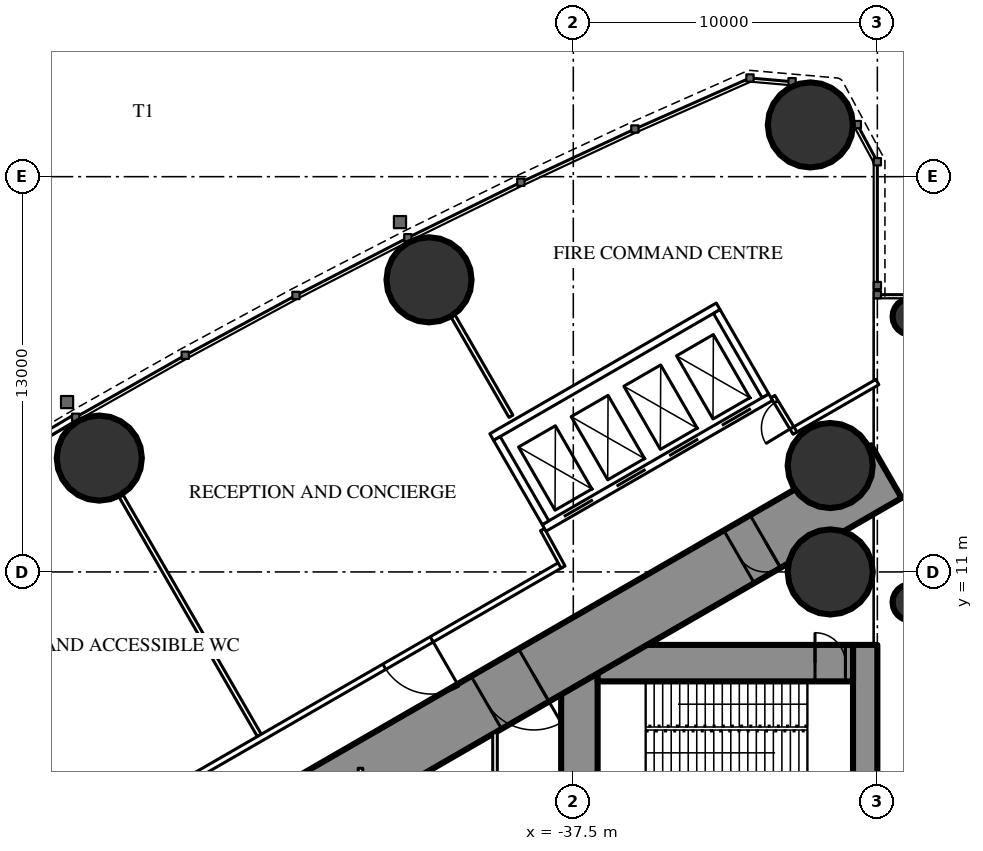
"""IFC4 building model, lengths in metres.
Left out: names, types, materials, properties, quantities, classifications, styles, units other than length and angle.
Written with IfcOpenShell. Run it as: python <this file> out.ifc"""

import sys

from ifc_helpers import new_model, si_unit, direction, frame, frame_2d, origin, origin_2d, place, context, subcontext, project, spatial, rectangle, circle, hollow_circle, extrude, element, fill, save


model = new_model("IFC4")
c1 = context("Model", 3, precision=1e-05, world=origin(), true_north=direction((0.0, 1.0)))
c2 = subcontext(c1, "Body", "Model", "MODEL_VIEW")
j1 = project(units=[si_unit("LENGTHUNIT", "METRE"), si_unit("PLANEANGLEUNIT", "RADIAN")], contexts=[c1])
p1 = place(None, origin())
s1 = spatial("IfcSite", under=j1, at=p1, CompositionType="ELEMENT")
p2 = place(p1, origin())
s2 = spatial("IfcBuilding", under=s1, at=p2, CompositionType="ELEMENT")
p3 = place(p2, origin())
s3 = spatial("IfcBuildingStorey", under=s2, at=p3, CompositionType="ELEMENT", Elevation=0.0)
for number, where, z_axis, x_axis in (
    (1, (-29.703, 25.703, 0.0), (0.0, 0.0, 1.0), (1.0, 0.0, 0.0)),
    (2, (-29.05, 11.0, 0.0), (0.0, 0.0, 1.0), (1.0, 0.0, 0.0)),
    (3, (-29.05, 14.5, 0.0), (0.0, 0.0, 1.0), (1.0, 0.0, 0.0)),
    (4, (-42.245, 20.607, 0.0), (0.0, 0.0, 1.0), (1.0, 0.0, 0.0)),
    (5, (-53.09, 14.745, 0.0), (0.0, 0.0, 1.0), (1.0, 0.0, 0.0)),
):
    element("IfcColumn", number, at=place(p3, frame(where, z_axis=z_axis, x_axis=x_axis)), inside=s3, PredefinedType="COLUMN", context=c2, shape_type="SweptSolid", body=[
        extrude(hollow_circle(Radius=1.4, WallThickness=0.12, at=origin_2d()), origin(), (0.0, 0.0, 1.0), 7.2),
    ])
p4 = place(p3, frame((-27.9, 8.6, 0.0), z_axis=(0.0, 0.0, 1.0), x_axis=(0.0, -1.0, 0.0)))
e6 = element("IfcWall", 6, at=p4, inside=s3, PredefinedType="SHEAR", context=c2, shape_type="SweptSolid", body=[
    extrude(rectangle(XDim=17.2, YDim=0.8, at=frame_2d((8.6, 0.0))), origin(), (0.0, 0.0, 1.0), 7.2),
])
p5 = place(p3, frame((-37.3, 8.6, 0.0), z_axis=(0.0, 0.0, 1.0), x_axis=(0.0, -1.0, 0.0)))
e7 = element("IfcWall", 7, at=p5, inside=s3, PredefinedType="SHEAR", context=c2, shape_type="SweptSolid", body=[
    extrude(rectangle(XDim=17.2, YDim=1.2, at=frame_2d((8.6, 0.0))), origin(), (0.0, 0.0, 1.0), 7.2),
])
p6 = place(p5, frame((7.7, 0.0, 0.0)))
e8 = element("IfcOpeningElement", 8, at=p6, cuts=e7, PredefinedType="OPENING", context=c2, shape_type="SweptSolid", body=[
    extrude(rectangle(XDim=1.8, YDim=2.2, at=frame_2d((0.9, 1.1))), frame((0.0, 0.61, 0.0), z_axis=(0.0, -1.0, 0.0), x_axis=(1.0, 0.0, 0.0)), (0.0, 0.0, 1.0), 1.22),
])
p7 = place(p3, frame((-28.3, 8.0, 0.0), z_axis=(0.0, 0.0, 1.0), x_axis=(-1.0, 0.0, 0.0)))
e9 = element("IfcWall", 9, at=p7, inside=s3, PredefinedType="SHEAR", context=c2, shape_type="SweptSolid", body=[
    extrude(rectangle(XDim=8.4, YDim=1.2, at=frame_2d((4.2, 0.0))), origin(), (0.0, 0.0, 1.0), 7.2),
])
p8 = place(p7, frame((0.25, 0.0, 0.0)))
e10 = element("IfcOpeningElement", 10, at=p8, cuts=e9, PredefinedType="OPENING", context=c2, shape_type="SweptSolid", body=[
    extrude(rectangle(XDim=1.0, YDim=2.2, at=frame_2d((0.5, 1.1))), frame((0.0, 0.61, 0.0), z_axis=(0.0, -1.0, 0.0), x_axis=(1.0, 0.0, 0.0)), (0.0, 0.0, 1.0), 1.22),
])
p9 = place(p3, frame((-27.2, 14.3, 0.0), z_axis=(0.0, 0.0, 1.0), x_axis=(-0.866026593062, -0.499997940104, 0.0)))
e11 = element("IfcWall", 11, at=p9, inside=s3, PredefinedType="SHEAR", context=c2, shape_type="SweptSolid", body=[
    extrude(rectangle(XDim=28.946, YDim=2.0, at=frame_2d((14.473, 0.0))), origin(), (0.0, 0.0, 1.0), 7.2),
])
p10 = place(p9, frame((4.6, 0.0, 0.0)))
e12 = element("IfcOpeningElement", 12, at=p10, cuts=e11, PredefinedType="OPENING", context=c2, shape_type="SweptSolid", body=[
    extrude(rectangle(XDim=1.0, YDim=2.2, at=frame_2d((0.5, 1.1))), frame((0.0, 1.01, 0.0), z_axis=(0.0, -1.0, 0.0), x_axis=(1.0, 0.0, 0.0)), (0.0, 0.0, 1.0), 2.02),
])
p11 = place(p9, frame((13.395, 0.0, 0.0)))
e13 = element("IfcOpeningElement", 13, at=p11, cuts=e11, PredefinedType="OPENING", context=c2, shape_type="SweptSolid", body=[
    extrude(rectangle(XDim=1.8, YDim=2.2, at=frame_2d((0.9, 1.1))), frame((0.0, 1.01, 0.0), z_axis=(0.0, -1.0, 0.0), x_axis=(1.0, 0.0, 0.0)), (0.0, 0.0, 1.0), 2.02),
])
for number, where, z_axis, x_axis in (
    (14, (-26.4, 10.0, 0.0), (0.0, 0.0, 1.0), (1.0, 0.0, 0.0)),
    (15, (-26.4, 19.4, 0.0), (0.0, 0.0, 1.0), (1.0, 0.0, 0.0)),
):
    element("IfcColumn", number, at=place(p3, frame(where, z_axis=z_axis, x_axis=x_axis)), inside=s3, PredefinedType="COLUMN", context=c2, shape_type="SweptSolid", body=[
        extrude(circle(Radius=0.6, at=origin_2d()), origin(), (0.0, 0.0, 1.0), 7.2),
    ])
p12 = place(p3, frame((-57.429, 13.976, 0.0), z_axis=(0.0, 0.0, 1.0), x_axis=(0.860382514165, 0.50964882941, 0.0)))
e16 = element("IfcWall", 16, at=p12, inside=s3, PredefinedType="STANDARD", context=c2, shape_type="SweptSolid", body=[
    extrude(rectangle(XDim=4.14, YDim=0.2, at=frame_2d((2.07, 0.0))), origin(), (0.0, 0.0, 1.0), 6.85),
])
p13 = place(p12, frame((1.02, 0.0, 0.0)))
e17 = element("IfcOpeningElement", 17, at=p13, cuts=e16, PredefinedType="OPENING", context=c2, shape_type="SweptSolid", body=[
    extrude(rectangle(XDim=1.8, YDim=2.4, at=frame_2d((0.9, 1.2))), frame((0.0, 0.11, 0.0), z_axis=(0.0, -1.0, 0.0), x_axis=(1.0, 0.0, 0.0)), (0.0, 0.0, 1.0), 0.22),
])
p14 = place(p3, frame((-47.827, 5.624, 0.0), z_axis=(0.0, 0.0, 1.0), x_axis=(-0.499995404498, 0.866028056982, 0.0)))
e18 = element("IfcWall", 18, at=p14, inside=s3, PredefinedType="PARTITIONING", context=c2, shape_type="SweptSolid", body=[
    extrude(rectangle(XDim=9.11, YDim=0.15, at=frame_2d((4.555, 0.0))), origin(), (0.0, 0.0, 1.0), 5.85),
])
p15 = place(p3, frame((-39.551, 16.119, 0.0), z_axis=(0.0, 0.0, 1.0), x_axis=(-0.500014214979, 0.866017196607, 0.0)))
e19 = element("IfcWall", 19, at=p15, inside=s3, PredefinedType="PARTITIONING", context=c2, shape_type="SweptSolid", body=[
    extrude(rectangle(XDim=3.815, YDim=0.15, at=frame_2d((1.907, 0.0))), origin(), (0.0, 0.0, 1.0), 6.85),
])
p16 = place(p3, frame((-27.5, 17.244, 0.0), z_axis=(0.0, 0.0, 1.0), x_axis=(-0.866039316896, -0.499975901009, 0.0)))
e20 = element("IfcWall", 20, at=p16, inside=s3, PredefinedType="PARTITIONING", context=c2, shape_type="SweptSolid", body=[
    extrude(rectangle(XDim=3.169, YDim=0.2, at=frame_2d((1.584, 0.0))), origin(), (0.0, 0.0, 1.0), 6.85),
])
p17 = place(p3, frame((-37.9, 11.24, 0.0), z_axis=(0.0, 0.0, 1.0), x_axis=(-0.866022995118, -0.50000417191, 0.0)))
e21 = element("IfcWall", 21, at=p17, inside=s3, PredefinedType="PARTITIONING", context=c2, shape_type="SweptSolid", body=[
    extrude(rectangle(XDim=22.48, YDim=0.2, at=frame_2d((11.24, 0.0))), origin(), (0.0, 0.0, 1.0), 6.85),
])
p18 = place(p17, frame((14.644, 0.0, 0.0)))
e22 = element("IfcOpeningElement", 22, at=p18, cuts=e21, PredefinedType="OPENING", context=c2, shape_type="SweptSolid", body=[
    extrude(rectangle(XDim=1.8, YDim=2.2, at=frame_2d((0.9, 1.1))), frame((0.0, 0.11, 0.0), z_axis=(0.0, -1.0, 0.0), x_axis=(1.0, 0.0, 0.0)), (0.0, 0.0, 1.0), 0.22),
])
p19 = place(p17, frame((20.069, 0.0, 0.0)))
e23 = element("IfcOpeningElement", 23, at=p19, cuts=e21, PredefinedType="OPENING", context=c2, shape_type="SweptSolid", body=[
    extrude(rectangle(XDim=1.8, YDim=2.2, at=frame_2d((0.9, 1.1))), frame((0.0, 0.11, 0.0), z_axis=(0.0, -1.0, 0.0), x_axis=(1.0, 0.0, 0.0)), (0.0, 0.0, 1.0), 0.22),
])
p20 = place(p17, frame((4.915, 0.0, 0.0)))
e24 = element("IfcOpeningElement", 24, at=p20, cuts=e21, PredefinedType="OPENING", context=c2, shape_type="SweptSolid", body=[
    extrude(rectangle(XDim=1.8, YDim=2.2, at=frame_2d((0.9, 1.1))), frame((0.0, 0.11, 0.0), z_axis=(0.0, -1.0, 0.0), x_axis=(1.0, 0.0, 0.0)), (0.0, 0.0, 1.0), 0.22),
])
p21 = place(p3, frame((-30.207, 15.566, 0.0), z_axis=(0.0, 0.0, 1.0), x_axis=(-0.518374889333, 0.855153479855, 0.0)))
e25 = element("IfcWall", 25, at=p21, inside=s3, PredefinedType="PARTITIONING", context=c2, shape_type="SweptSolid", body=[
    extrude(rectangle(XDim=1.405, YDim=0.15, at=frame_2d((0.703, 0.0))), origin(), (0.0, 0.0, 1.0), 6.85),
])
p22 = place(p21, frame((0.202, 0.0, 0.0)))
e26 = element("IfcOpeningElement", 26, at=p22, cuts=e25, PredefinedType="OPENING", context=c2, shape_type="SweptSolid", body=[
    extrude(rectangle(XDim=1.0, YDim=2.2, at=frame_2d((0.5, 1.1))), frame((0.0, 0.085, 0.0), z_axis=(0.0, -1.0, 0.0), x_axis=(1.0, 0.0, 0.0)), (0.0, 0.0, 1.0), 0.17),
])
p23 = place(p3, frame((-38.513, 12.392, 0.0), z_axis=(0.0, 0.0, 1.0), x_axis=(0.481358300093, -0.876523922624, 0.0)))
e27 = element("IfcWall", 27, at=p23, inside=s3, PredefinedType="PARTITIONING", context=c2, shape_type="SweptSolid", body=[
    extrude(rectangle(XDim=1.405, YDim=0.15, at=frame_2d((0.703, 0.0))), origin(), (0.0, 0.0, 1.0), 6.85),
])
p24 = place(p3, frame((-40.075, 5.712, 0.0), z_axis=(0.0, 0.0, 1.0), x_axis=(0.0, -1.0, 0.0)))
e28 = element("IfcWall", 28, at=p24, inside=s3, PredefinedType="PARTITIONING", context=c2, shape_type="SweptSolid", body=[
    extrude(rectangle(XDim=11.424, YDim=0.15, at=frame_2d((5.712, 0.0))), origin(), (0.0, 0.0, 1.0), 6.85),
])
p25 = place(p24, frame((4.812, 0.0, 0.0)))
e29 = element("IfcOpeningElement", 29, at=p25, cuts=e28, PredefinedType="OPENING", context=c2, shape_type="SweptSolid", body=[
    extrude(rectangle(XDim=1.8, YDim=2.2, at=frame_2d((0.9, 1.1))), frame((0.0, 0.085, 0.0), z_axis=(0.0, -1.0, 0.0), x_axis=(1.0, 0.0, 0.0)), (0.0, 0.0, 1.0), 0.17),
])
p26 = place(p3, frame((-44.5, 4.543, 0.0), z_axis=(0.0, 0.0, 1.0), x_axis=(0.0, -1.0, 0.0)))
e30 = element("IfcWall", 30, at=p26, inside=s3, PredefinedType="PARTITIONING", context=c2, shape_type="SweptSolid", body=[
    extrude(rectangle(XDim=9.085, YDim=0.15, at=frame_2d((4.543, 0.0))), origin(), (0.0, 0.0, 1.0), 6.85),
])
p27 = place(p26, frame((4.043, 0.0, 0.0)))
e31 = element("IfcOpeningElement", 31, at=p27, cuts=e30, PredefinedType="OPENING", context=c2, shape_type="SweptSolid", body=[
    extrude(rectangle(XDim=1.0, YDim=2.2, at=frame_2d((0.5, 1.1))), frame((0.0, 0.085, 0.0), z_axis=(0.0, -1.0, 0.0), x_axis=(1.0, 0.0, 0.0)), (0.0, 0.0, 1.0), 0.17),
])
p28 = place(p3, frame((-31.01, 16.747, 0.0), z_axis=(0.0, 0.0, 1.0), x_axis=(-0.866028165386, -0.499995216735, 0.0)))
e32 = element("IfcWall", 32, at=p28, inside=s3, PredefinedType="PARTITIONING", context=c2, shape_type="SweptSolid", body=[
    extrude(rectangle(XDim=8.6, YDim=0.25, at=frame_2d((4.3, 0.0))), origin(), (0.0, 0.0, 1.0), 6.85),
])
p29 = place(p28, frame((0.75, 0.0, 0.0)))
e33 = element("IfcOpeningElement", 33, at=p29, cuts=e32, PredefinedType="OPENING", context=c2, shape_type="SweptSolid", body=[
    extrude(rectangle(XDim=1.1, YDim=2.2, at=frame_2d((0.55, 1.1))), frame((0.0, 0.135, 0.0), z_axis=(0.0, -1.0, 0.0), x_axis=(1.0, 0.0, 0.0)), (0.0, 0.0, 1.0), 0.27),
])
p30 = place(p28, frame((2.75, 0.0, 0.0)))
e34 = element("IfcOpeningElement", 34, at=p30, cuts=e32, PredefinedType="OPENING", context=c2, shape_type="SweptSolid", body=[
    extrude(rectangle(XDim=1.1, YDim=2.2, at=frame_2d((0.55, 1.1))), frame((0.0, 0.135, 0.0), z_axis=(0.0, -1.0, 0.0), x_axis=(1.0, 0.0, 0.0)), (0.0, 0.0, 1.0), 0.27),
])
p31 = place(p28, frame((4.75, 0.0, 0.0)))
e35 = element("IfcOpeningElement", 35, at=p31, cuts=e32, PredefinedType="OPENING", context=c2, shape_type="SweptSolid", body=[
    extrude(rectangle(XDim=1.1, YDim=2.2, at=frame_2d((0.55, 1.1))), frame((0.0, 0.135, 0.0), z_axis=(0.0, -1.0, 0.0), x_axis=(1.0, 0.0, 0.0)), (0.0, 0.0, 1.0), 0.27),
])
p32 = place(p28, frame((6.75, 0.0, 0.0)))
e36 = element("IfcOpeningElement", 36, at=p32, cuts=e32, PredefinedType="OPENING", context=c2, shape_type="SweptSolid", body=[
    extrude(rectangle(XDim=1.1, YDim=2.2, at=frame_2d((0.55, 1.1))), frame((0.0, 0.135, 0.0), z_axis=(0.0, -1.0, 0.0), x_axis=(1.0, 0.0, 0.0)), (0.0, 0.0, 1.0), 0.27),
])
p33 = place(p3, frame((-32.736, 19.736, 0.0), z_axis=(0.0, 0.0, 1.0), x_axis=(-0.866028165386, -0.499995216735, 0.0)))
e37 = element("IfcWall", 37, at=p33, inside=s3, PredefinedType="PARTITIONING", context=c2, shape_type="SweptSolid", body=[
    extrude(rectangle(XDim=8.6, YDim=0.25, at=frame_2d((4.3, 0.0))), origin(), (0.0, 0.0, 1.0), 6.85),
])
p34 = place(p3, frame((-31.181, 16.793, 0.0), z_axis=(0.0, 0.0, 1.0), x_axis=(-0.499929347863, 0.866066190972, 0.0)))
e38 = element("IfcWall", 38, at=p34, inside=s3, PredefinedType="PARTITIONING", context=c2, shape_type="SweptSolid", body=[
    extrude(rectangle(XDim=3.201, YDim=0.25, at=frame_2d((1.6, 0.0))), origin(), (0.0, 0.0, 1.0), 6.85),
])
p35 = place(p3, frame((-38.413, 12.618, 0.0), z_axis=(0.0, 0.0, 1.0), x_axis=(-0.499872130319, 0.866099216793, 0.0)))
e39 = element("IfcWall", 39, at=p35, inside=s3, PredefinedType="PARTITIONING", context=c2, shape_type="SweptSolid", body=[
    extrude(rectangle(XDim=3.2, YDim=0.25, at=frame_2d((1.6, 0.0))), origin(), (0.0, 0.0, 1.0), 6.85),
])
p36 = place(p22, origin())
e40 = element("IfcDoor", 40, at=p36, inside=s3, OperationType="SINGLE_SWING_LEFT", PredefinedType="DOOR", context=c2, shape_type="SweptSolid", body=[
    extrude(rectangle(XDim=1.0, YDim=2.2, at=frame_2d((0.5, 1.1))), frame((0.0, 0.025, 0.0), z_axis=(0.0, -1.0, 0.0), x_axis=(1.0, 0.0, 0.0)), (0.0, 0.0, 1.0), 0.05),
])
fill(e26, e40)
p37 = place(p20, origin())
e41 = element("IfcDoor", 41, at=p37, inside=s3, OperationType="DOUBLE_DOOR_SINGLE_SWING", PredefinedType="DOOR", context=c2, shape_type="SweptSolid", body=[
    extrude(rectangle(XDim=1.8, YDim=2.2, at=frame_2d((0.9, 1.1))), frame((0.0, 0.025, 0.0), z_axis=(0.0, -1.0, 0.0), x_axis=(1.0, 0.0, 0.0)), (0.0, 0.0, 1.0), 0.05),
])
fill(e24, e41)
p38 = place(p10, origin())
e42 = element("IfcDoor", 42, at=p38, inside=s3, OperationType="SINGLE_SWING_LEFT", PredefinedType="DOOR", context=c2, shape_type="SweptSolid", body=[
    extrude(rectangle(XDim=1.0, YDim=2.2, at=frame_2d((0.5, 1.1))), frame((0.0, 0.025, 0.0), z_axis=(0.0, -1.0, 0.0), x_axis=(1.0, 0.0, 0.0)), (0.0, 0.0, 1.0), 0.05),
])
fill(e12, e42)
p39 = place(p11, origin())
e43 = element("IfcDoor", 43, at=p39, inside=s3, OperationType="DOUBLE_DOOR_SINGLE_SWING", PredefinedType="DOOR", context=c2, shape_type="SweptSolid", body=[
    extrude(rectangle(XDim=1.8, YDim=2.2, at=frame_2d((0.9, 1.1))), frame((0.0, 0.025, 0.0), z_axis=(0.0, -1.0, 0.0), x_axis=(1.0, 0.0, 0.0)), (0.0, 0.0, 1.0), 0.05),
])
fill(e13, e43)
p40 = place(p8, origin())
e44 = element("IfcDoor", 44, at=p40, inside=s3, OperationType="SINGLE_SWING_RIGHT", PredefinedType="DOOR", context=c2, shape_type="SweptSolid", body=[
    extrude(rectangle(XDim=1.0, YDim=2.2, at=frame_2d((0.5, 1.1))), frame((0.0, 0.025, 0.0), z_axis=(0.0, -1.0, 0.0), x_axis=(1.0, 0.0, 0.0)), (0.0, 0.0, 1.0), 0.05),
])
fill(e10, e44)
p41 = place(p29, origin())
e45 = element("IfcDoor", 45, at=p41, inside=s3, OperationType="DOUBLE_DOOR_SLIDING", PredefinedType="USERDEFINED", context=c2, shape_type="SweptSolid", body=[
    extrude(rectangle(XDim=1.1, YDim=2.2, at=frame_2d((0.55, 1.1))), frame((0.0, 0.025, 0.0), z_axis=(0.0, -1.0, 0.0), x_axis=(1.0, 0.0, 0.0)), (0.0, 0.0, 1.0), 0.05),
])
fill(e33, e45)
p42 = place(p30, origin())
e46 = element("IfcDoor", 46, at=p42, inside=s3, OperationType="DOUBLE_DOOR_SLIDING", PredefinedType="USERDEFINED", context=c2, shape_type="SweptSolid", body=[
    extrude(rectangle(XDim=1.1, YDim=2.2, at=frame_2d((0.55, 1.1))), frame((0.0, 0.025, 0.0), z_axis=(0.0, -1.0, 0.0), x_axis=(1.0, 0.0, 0.0)), (0.0, 0.0, 1.0), 0.05),
])
fill(e34, e46)
p43 = place(p31, origin())
e47 = element("IfcDoor", 47, at=p43, inside=s3, OperationType="DOUBLE_DOOR_SLIDING", PredefinedType="USERDEFINED", context=c2, shape_type="SweptSolid", body=[
    extrude(rectangle(XDim=1.1, YDim=2.2, at=frame_2d((0.55, 1.1))), frame((0.0, 0.025, 0.0), z_axis=(0.0, -1.0, 0.0), x_axis=(1.0, 0.0, 0.0)), (0.0, 0.0, 1.0), 0.05),
])
fill(e35, e47)
p44 = place(p32, origin())
e48 = element("IfcDoor", 48, at=p44, inside=s3, OperationType="DOUBLE_DOOR_SLIDING", PredefinedType="USERDEFINED", context=c2, shape_type="SweptSolid", body=[
    extrude(rectangle(XDim=1.1, YDim=2.2, at=frame_2d((0.55, 1.1))), frame((0.0, 0.025, 0.0), z_axis=(0.0, -1.0, 0.0), x_axis=(1.0, 0.0, 0.0)), (0.0, 0.0, 1.0), 0.05),
])
fill(e36, e48)
save(model, sys.argv[1])
